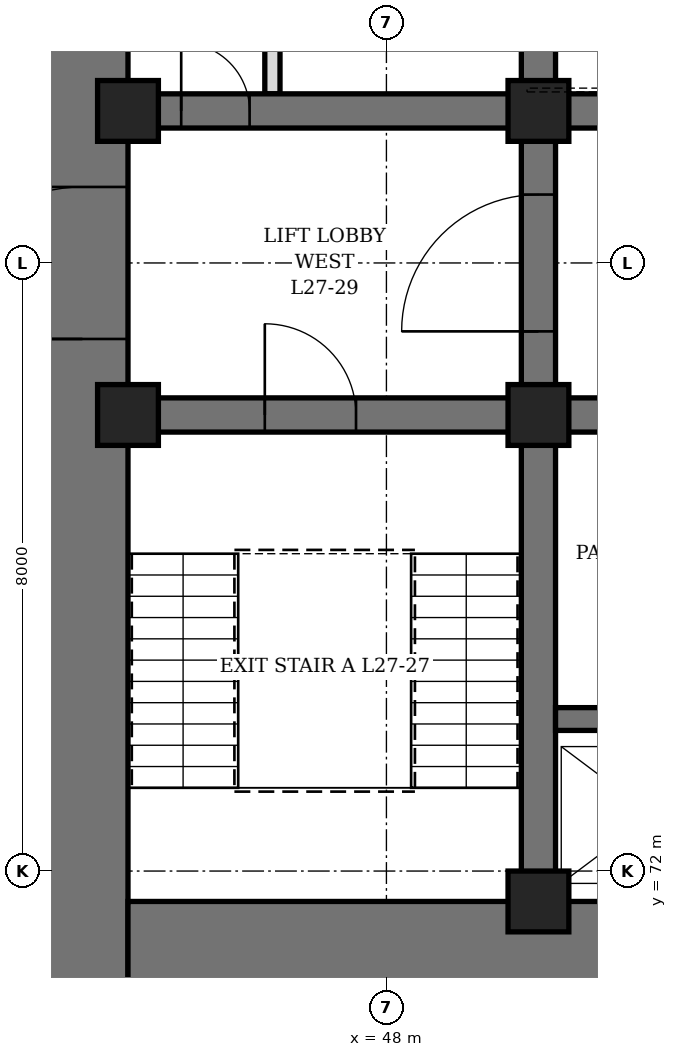
"""IFC4 building model, lengths in metres.
Left out: names, types, materials, properties, quantities, classifications, styles, units other than length and angle.
Written with IfcOpenShell. Run it as: python <this file> out.ifc"""

import sys

from ifc_helpers import new_model, si_unit, direction, frame, frame_2d, origin, origin_2d, place, context, subcontext, project, spatial, rectangle, hollow_rectangle, extrude, element, fill, save


model = new_model("IFC4")
c1 = context("Model", 3, precision=1e-05, world=origin(), true_north=direction((0.0, 1.0)))
c2 = subcontext(c1, "Body", "Model", "MODEL_VIEW")
j1 = project(units=[si_unit("LENGTHUNIT", "METRE"), si_unit("PLANEANGLEUNIT", "RADIAN")], contexts=[c1])
p1 = place(None, origin())
s1 = spatial("IfcSite", under=j1, at=p1, CompositionType="ELEMENT")
p2 = place(p1, origin())
s2 = spatial("IfcBuilding", under=s1, at=p2, CompositionType="ELEMENT")
p3 = place(p2, frame((0.0, 0.0, 124.9)))
s3 = spatial("IfcBuildingStorey", under=s2, at=p3, CompositionType="ELEMENT", Elevation=124.9)
p4 = place(p3, frame((44.0, 70.4, 0.0), z_axis=(0.0, 0.0, 1.0), x_axis=(0.0, 1.0, 0.0)))
e1 = element("IfcWall", 1, at=p4, inside=s3, PredefinedType="SHEAR", context=c2, shape_type="SweptSolid", body=[
    extrude(rectangle(XDim=19.2, YDim=1.2, at=frame_2d((9.6, 0.0))), origin(), (0.0, 0.0, 1.0), 4.2),
])
p5 = place(p4, frame((8.6, 0.0, 0.0)))
e2 = element("IfcOpeningElement", 2, at=p5, cuts=e1, PredefinedType="OPENING", context=c2, shape_type="SweptSolid", body=[
    extrude(rectangle(XDim=2.0, YDim=2.4, at=frame_2d((1.0, 1.2))), frame((0.0, 0.61, 0.0), z_axis=(0.0, -1.0, 0.0), x_axis=(1.0, 0.0, 0.0)), (0.0, 0.0, 1.0), 1.22),
])
p6 = place(p3, frame((44.6, 71.0, 0.0), z_axis=(0.0, 0.0, 1.0), x_axis=(1.0, 0.0, 0.0)))
e3 = element("IfcWall", 3, at=p6, inside=s3, PredefinedType="SHEAR", context=c2, shape_type="SweptSolid", body=[
    extrude(rectangle(XDim=22.8, YDim=1.2, at=frame_2d((11.4, 0.0))), origin(), (0.0, 0.0, 1.0), 4.2),
])
p7 = place(p3, frame((50.0, 71.6, 0.0), z_axis=(0.0, 0.0, 1.0), x_axis=(0.0, 1.0, 0.0)))
e4 = element("IfcWall", 4, at=p7, inside=s3, PredefinedType="SHEAR", context=c2, shape_type="SweptSolid", body=[
    extrude(rectangle(XDim=16.8, YDim=0.45, at=frame_2d((8.4, 0.0))), origin(), (0.0, 0.0, 1.0), 4.2),
])
p8 = place(p7, frame((7.5, 0.0, 0.0)))
e5 = element("IfcOpeningElement", 5, at=p8, cuts=e4, PredefinedType="OPENING", context=c2, shape_type="SweptSolid", body=[
    extrude(rectangle(XDim=1.8, YDim=2.4, at=frame_2d((0.9, 1.2))), frame((0.0, 0.235, 0.0), z_axis=(0.0, -1.0, 0.0), x_axis=(1.0, 0.0, 0.0)), (0.0, 0.0, 1.0), 0.47),
])
p9 = place(p3, frame((44.6, 78.0, 0.0), z_axis=(0.0, 0.0, 1.0), x_axis=(1.0, 0.0, 0.0)))
e6 = element("IfcWall", 6, at=p9, inside=s3, PredefinedType="SHEAR", context=c2, shape_type="SweptSolid", body=[
    extrude(rectangle(XDim=5.175, YDim=0.45, at=frame_2d((2.587, 0.0))), origin(), (0.0, 0.0, 1.0), 4.2),
])
p10 = place(p9, frame((1.8, 0.0, 0.0)))
e7 = element("IfcOpeningElement", 7, at=p10, cuts=e6, PredefinedType="OPENING", context=c2, shape_type="SweptSolid", body=[
    extrude(rectangle(XDim=1.2, YDim=2.1, at=frame_2d((0.6, 1.05))), frame((0.0, 0.235, 0.0), z_axis=(0.0, -1.0, 0.0), x_axis=(1.0, 0.0, 0.0)), (0.0, 0.0, 1.0), 0.47),
])
p11 = place(p3, frame((44.6, 82.0, 0.0), z_axis=(0.0, 0.0, 1.0), x_axis=(1.0, 0.0, 0.0)))
e8 = element("IfcWall", 8, at=p11, inside=s3, PredefinedType="SHEAR", context=c2, shape_type="SweptSolid", body=[
    extrude(rectangle(XDim=5.175, YDim=0.45, at=frame_2d((2.587, 0.0))), origin(), (0.0, 0.0, 1.0), 4.2),
])
p12 = place(p11, frame((0.7, 0.0, 0.0)))
e9 = element("IfcOpeningElement", 9, at=p12, cuts=e8, PredefinedType="OPENING", context=c2, shape_type="SweptSolid", body=[
    extrude(rectangle(XDim=0.9, YDim=2.1, at=frame_2d((0.45, 1.05))), frame((0.0, 0.235, 0.0), z_axis=(0.0, -1.0, 0.0), x_axis=(1.0, 0.0, 0.0)), (0.0, 0.0, 1.0), 0.47),
])
p13 = place(p3, frame((50.225, 78.0, 0.0), z_axis=(0.0, 0.0, 1.0), x_axis=(1.0, 0.0, 0.0)))
e10 = element("IfcWall", 10, at=p13, inside=s3, PredefinedType="SHEAR", context=c2, shape_type="SweptSolid", body=[
    extrude(rectangle(XDim=11.55, YDim=0.45, at=frame_2d((5.775, 0.0))), origin(), (0.0, 0.0, 1.0), 4.2),
])
p14 = place(p13, frame((0.825, 0.0, 0.0)))
e11 = element("IfcOpeningElement", 11, at=p14, cuts=e10, PredefinedType="OPENING", context=c2, shape_type="SweptSolid", body=[
    extrude(rectangle(XDim=0.9, YDim=2.1, at=frame_2d((0.45, 1.05))), frame((0.0, 0.235, 0.0), z_axis=(0.0, -1.0, 0.0), x_axis=(1.0, 0.0, 0.0)), (0.0, 0.0, 1.0), 0.47),
])
p15 = place(p13, frame((3.825, 0.0, 0.0)))
e12 = element("IfcOpeningElement", 12, at=p15, cuts=e10, PredefinedType="OPENING", context=c2, shape_type="SweptSolid", body=[
    extrude(rectangle(XDim=0.9, YDim=2.1, at=frame_2d((0.45, 1.05))), frame((0.0, 0.235, 0.0), z_axis=(0.0, -1.0, 0.0), x_axis=(1.0, 0.0, 0.0)), (0.0, 0.0, 1.0), 0.47),
])
p16 = place(p13, frame((6.825, 0.0, 0.0)))
e13 = element("IfcOpeningElement", 13, at=p16, cuts=e10, PredefinedType="OPENING", context=c2, shape_type="SweptSolid", body=[
    extrude(rectangle(XDim=0.9, YDim=2.1, at=frame_2d((0.45, 1.05))), frame((0.0, 0.235, 0.0), z_axis=(0.0, -1.0, 0.0), x_axis=(1.0, 0.0, 0.0)), (0.0, 0.0, 1.0), 0.47),
])
p17 = place(p13, frame((9.825, 0.0, 0.0)))
e14 = element("IfcOpeningElement", 14, at=p17, cuts=e10, PredefinedType="OPENING", context=c2, shape_type="SweptSolid", body=[
    extrude(rectangle(XDim=0.9, YDim=2.1, at=frame_2d((0.45, 1.05))), frame((0.0, 0.235, 0.0), z_axis=(0.0, -1.0, 0.0), x_axis=(1.0, 0.0, 0.0)), (0.0, 0.0, 1.0), 0.47),
])
p18 = place(p3, frame((50.225, 82.0, 0.0), z_axis=(0.0, 0.0, 1.0), x_axis=(1.0, 0.0, 0.0)))
e15 = element("IfcWall", 15, at=p18, inside=s3, PredefinedType="SHEAR", context=c2, shape_type="SweptSolid", body=[
    extrude(rectangle(XDim=11.55, YDim=0.45, at=frame_2d((5.775, 0.0))), origin(), (0.0, 0.0, 1.0), 4.2),
])
p19 = place(p18, frame((0.725, 0.0, 0.0)))
e16 = element("IfcOpeningElement", 16, at=p19, cuts=e15, PredefinedType="OPENING", context=c2, shape_type="SweptSolid", body=[
    extrude(rectangle(XDim=1.1, YDim=2.2, at=frame_2d((0.55, 1.1))), frame((0.0, 0.235, 0.0), z_axis=(0.0, -1.0, 0.0), x_axis=(1.0, 0.0, 0.0)), (0.0, 0.0, 1.0), 0.47),
])
p20 = place(p18, frame((3.725, 0.0, 0.0)))
e17 = element("IfcOpeningElement", 17, at=p20, cuts=e15, PredefinedType="OPENING", context=c2, shape_type="SweptSolid", body=[
    extrude(rectangle(XDim=1.1, YDim=2.2, at=frame_2d((0.55, 1.1))), frame((0.0, 0.235, 0.0), z_axis=(0.0, -1.0, 0.0), x_axis=(1.0, 0.0, 0.0)), (0.0, 0.0, 1.0), 0.47),
])
p21 = place(p18, frame((6.725, 0.0, 0.0)))
e18 = element("IfcOpeningElement", 18, at=p21, cuts=e15, PredefinedType="OPENING", context=c2, shape_type="SweptSolid", body=[
    extrude(rectangle(XDim=1.1, YDim=2.2, at=frame_2d((0.55, 1.1))), frame((0.0, 0.235, 0.0), z_axis=(0.0, -1.0, 0.0), x_axis=(1.0, 0.0, 0.0)), (0.0, 0.0, 1.0), 0.47),
])
p22 = place(p18, frame((9.725, 0.0, 0.0)))
e19 = element("IfcOpeningElement", 19, at=p22, cuts=e15, PredefinedType="OPENING", context=c2, shape_type="SweptSolid", body=[
    extrude(rectangle(XDim=1.1, YDim=2.2, at=frame_2d((0.55, 1.1))), frame((0.0, 0.235, 0.0), z_axis=(0.0, -1.0, 0.0), x_axis=(1.0, 0.0, 0.0)), (0.0, 0.0, 1.0), 0.47),
])
p23 = place(p3, frame((50.225, 74.0, 0.0), z_axis=(0.0, 0.0, 1.0), x_axis=(1.0, 0.0, 0.0)))
e20 = element("IfcWall", 20, at=p23, inside=s3, PredefinedType="SHEAR", context=c2, shape_type="SweptSolid", body=[
    extrude(rectangle(XDim=11.55, YDim=0.3, at=frame_2d((5.775, 0.0))), origin(), (0.0, 0.0, 1.0), 4.2),
])
for number, where, z_axis, x_axis in (
    (21, (44.6, 78.0, 0.0), (0.0, 0.0, 1.0), (1.0, 0.0, 0.0)),
    (22, (44.6, 82.0, 0.0), (0.0, 0.0, 1.0), (1.0, 0.0, 0.0)),
    (23, (50.0, 71.6, 0.0), (0.0, 0.0, 1.0), (1.0, 0.0, 0.0)),
    (24, (50.0, 78.0, 0.0), (0.0, 0.0, 1.0), (1.0, 0.0, 0.0)),
    (25, (50.0, 82.0, 0.0), (0.0, 0.0, 1.0), (1.0, 0.0, 0.0)),
):
    element("IfcColumn", number, at=place(p3, frame(where, z_axis=z_axis, x_axis=x_axis)), inside=s3, PredefinedType="COLUMN", context=c2, shape_type="SweptSolid", body=[
        extrude(hollow_rectangle(XDim=0.8, YDim=0.8, WallThickness=0.1, at=origin_2d()), origin(), (0.0, 0.0, 1.0), 4.2),
    ])
p24 = place(p3, frame((46.5, 82.225, 0.0), z_axis=(0.0, 0.0, 1.0), x_axis=(0.0, 1.0, 0.0)))
e26 = element("IfcWall", 26, at=p24, inside=s3, PredefinedType="PARTITIONING", context=c2, shape_type="SweptSolid", body=[
    extrude(rectangle(XDim=3.05, YDim=0.2, at=frame_2d((1.525, 0.0))), origin(), (0.0, 0.0, 1.0), 4.04),
])
p25 = place(p24, frame((1.075, 0.0, 0.0)))
e27 = element("IfcOpeningElement", 27, at=p25, cuts=e26, PredefinedType="OPENING", context=c2, shape_type="SweptSolid", body=[
    extrude(rectangle(XDim=0.9, YDim=2.1, at=frame_2d((0.45, 1.05))), frame((0.0, 0.11, 0.0), z_axis=(0.0, -1.0, 0.0), x_axis=(1.0, 0.0, 0.0)), (0.0, 0.0, 1.0), 0.22),
])
p26 = place(p12, origin())
e28 = element("IfcDoor", 28, at=p26, inside=s3, OperationType="SINGLE_SWING_LEFT", PredefinedType="DOOR", context=c2, shape_type="SweptSolid", body=[
    extrude(rectangle(XDim=0.9, YDim=2.1, at=frame_2d((0.45, 1.05))), frame((0.0, 0.225, 0.0), z_axis=(0.0, -1.0, 0.0), x_axis=(1.0, 0.0, 0.0)), (0.0, 0.0, 1.0), 0.449),
])
fill(e9, e28)
p27 = place(p10, origin())
e29 = element("IfcDoor", 29, at=p27, inside=s3, OperationType="SINGLE_SWING_LEFT", PredefinedType="DOOR", context=c2, shape_type="SweptSolid", body=[
    extrude(rectangle(XDim=1.2, YDim=2.1, at=frame_2d((0.6, 1.05))), frame((0.0, 0.225, 0.0), z_axis=(0.0, -1.0, 0.0), x_axis=(1.0, 0.0, 0.0)), (0.0, 0.0, 1.0), 0.449),
])
fill(e7, e29)
p28 = place(p5, origin())
e30 = element("IfcDoor", 30, at=p28, inside=s3, OperationType="DOUBLE_DOOR_SINGLE_SWING", PredefinedType="DOOR", context=c2, shape_type="SweptSolid", body=[
    extrude(rectangle(XDim=2.0, YDim=2.4, at=frame_2d((1.0, 1.2))), frame((0.0, 0.35, 0.0), z_axis=(0.0, -1.0, 0.0), x_axis=(1.0, 0.0, 0.0)), (0.0, 0.0, 1.0), 0.7),
])
fill(e2, e30)
p29 = place(p8, origin())
e31 = element("IfcDoor", 31, at=p29, inside=s3, OperationType="DOUBLE_DOOR_SINGLE_SWING", PredefinedType="DOOR", context=c2, shape_type="SweptSolid", body=[
    extrude(rectangle(XDim=1.8, YDim=2.4, at=frame_2d((0.9, 1.2))), frame((0.0, 0.225, 0.0), z_axis=(0.0, -1.0, 0.0), x_axis=(1.0, 0.0, 0.0)), (0.0, 0.0, 1.0), 0.449),
])
fill(e5, e31)
save(model, sys.argv[1])
